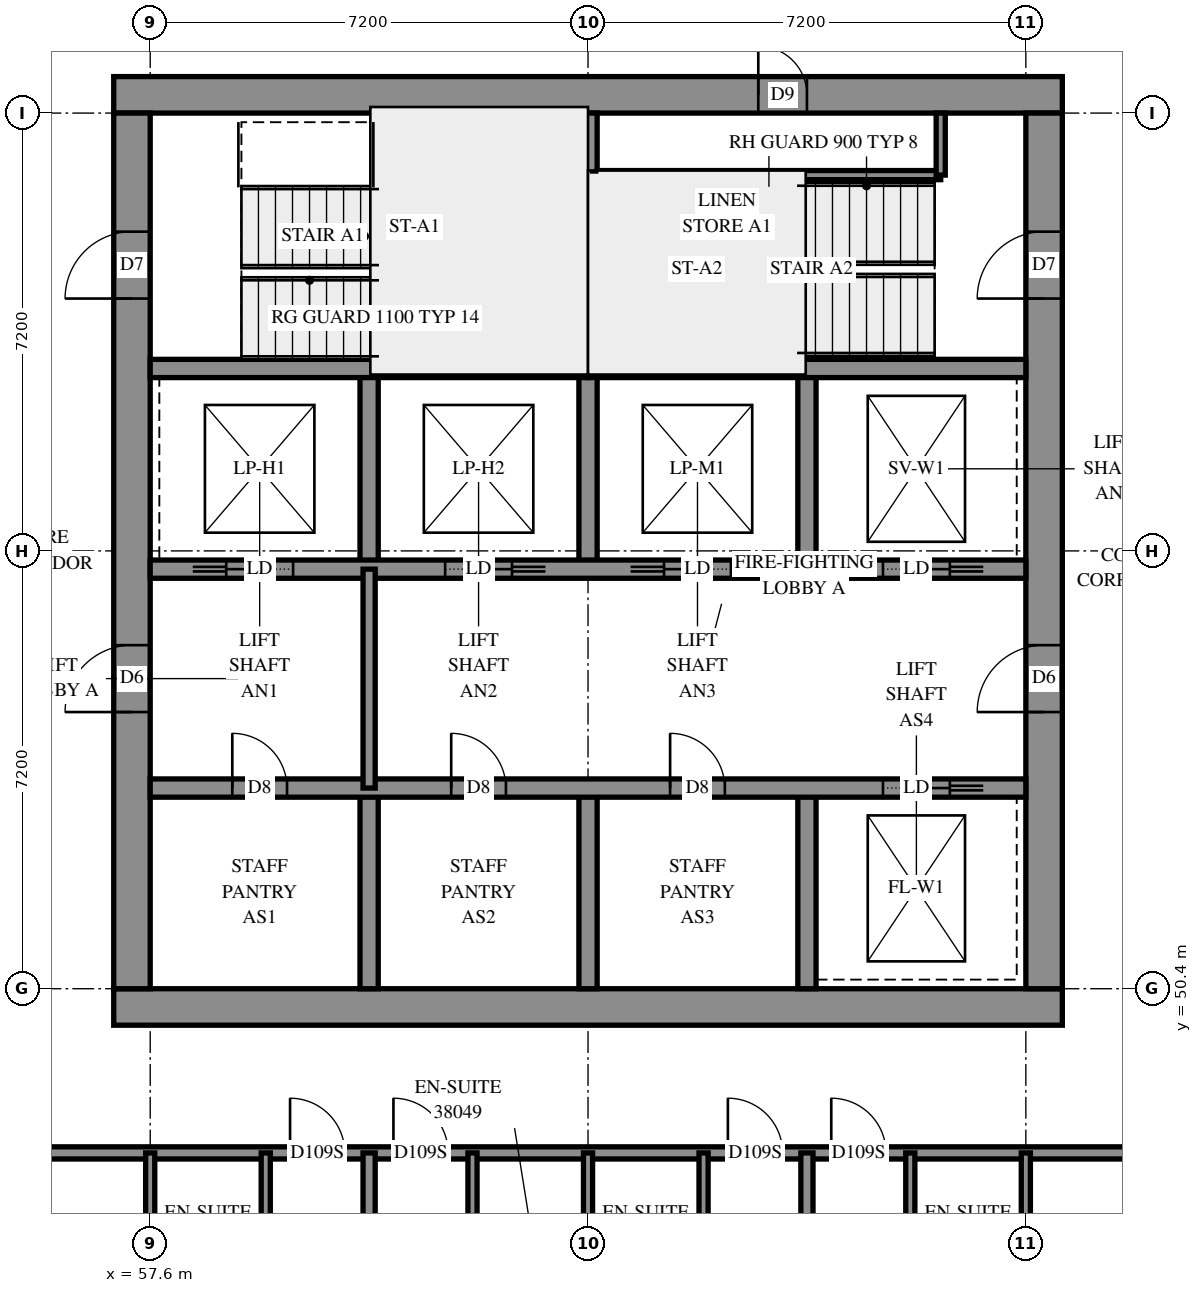
"""IFC4 building model, lengths in metres.
Left out: names, types, materials, properties, quantities, classifications, styles, units other than length and angle.
Written with IfcOpenShell. Run it as: python <this file> out.ifc"""

import sys

from ifc_helpers import new_model, si_unit, direction, frame, frame_2d, origin, place, context, subcontext, project, spatial, rectangle, extrude, element, fill, save


model = new_model("IFC4")
c1 = context("Model", 3, precision=1e-05, world=origin(), true_north=direction((0.0, 1.0)))
c2 = subcontext(c1, "Body", "Model", "MODEL_VIEW")
j1 = project(units=[si_unit("LENGTHUNIT", "METRE"), si_unit("PLANEANGLEUNIT", "RADIAN")], contexts=[c1])
p1 = place(None, origin())
s1 = spatial("IfcSite", under=j1, at=p1, CompositionType="ELEMENT")
p2 = place(p1, origin())
s2 = spatial("IfcBuilding", under=s1, at=p2, CompositionType="ELEMENT")
p3 = place(p2, frame((0.0, 0.0, 142.2)))
s3 = spatial("IfcBuildingStorey", under=s2, at=p3, CompositionType="ELEMENT", Elevation=142.2)
p4 = place(p3, frame((57.0, 50.1, -0.3), z_axis=(0.0, 0.0, 1.0), x_axis=(1.0, 0.0, 0.0)))
e1 = element("IfcWall", 1, at=p4, inside=s3, PredefinedType="SHEAR", context=c2, shape_type="SweptSolid", body=[
    extrude(rectangle(XDim=15.6, YDim=0.6, at=frame_2d((7.8, 0.0))), origin(), (0.0, 0.0, 1.0), 2.7),
])
p5 = place(p3, frame((57.0, 65.1, -0.3), z_axis=(0.0, 0.0, 1.0), x_axis=(1.0, 0.0, 0.0)))
e2 = element("IfcWall", 2, at=p5, inside=s3, PredefinedType="SHEAR", context=c2, shape_type="SweptSolid", body=[
    extrude(rectangle(XDim=15.6, YDim=0.6, at=frame_2d((7.8, 0.0))), origin(), (0.0, 0.0, 1.0), 2.7),
])
p6 = place(p5, frame((10.6, 0.0, 0.3)))
e3 = element("IfcOpeningElement", 3, at=p6, cuts=e2, PredefinedType="OPENING", context=c2, shape_type="SweptSolid", body=[
    extrude(rectangle(XDim=0.8, YDim=2.1, at=frame_2d((0.4, 1.05))), frame((0.0, 0.31, 0.0), z_axis=(0.0, -1.0, 0.0), x_axis=(1.0, 0.0, 0.0)), (0.0, 0.0, 1.0), 0.62),
])
p7 = place(p3, frame((57.3, 50.4, -0.3), z_axis=(0.0, 0.0, 1.0), x_axis=(0.0, 1.0, 0.0)))
e4 = element("IfcWall", 4, at=p7, inside=s3, PredefinedType="SHEAR", context=c2, shape_type="SweptSolid", body=[
    extrude(rectangle(XDim=14.4, YDim=0.6, at=frame_2d((7.2, 0.0))), origin(), (0.0, 0.0, 1.0), 2.7),
])
p8 = place(p7, frame((4.55, 0.0, 0.3)))
e5 = element("IfcOpeningElement", 5, at=p8, cuts=e4, PredefinedType="OPENING", context=c2, shape_type="SweptSolid", body=[
    extrude(rectangle(XDim=1.1, YDim=2.1, at=frame_2d((0.55, 1.05))), frame((0.0, 0.31, 0.0), z_axis=(0.0, -1.0, 0.0), x_axis=(1.0, 0.0, 0.0)), (0.0, 0.0, 1.0), 0.62),
])
p9 = place(p7, frame((11.35, 0.0, 0.3)))
e6 = element("IfcOpeningElement", 6, at=p9, cuts=e4, PredefinedType="OPENING", context=c2, shape_type="SweptSolid", body=[
    extrude(rectangle(XDim=1.1, YDim=2.1, at=frame_2d((0.55, 1.05))), frame((0.0, 0.31, 0.0), z_axis=(0.0, -1.0, 0.0), x_axis=(1.0, 0.0, 0.0)), (0.0, 0.0, 1.0), 0.62),
])
p10 = place(p3, frame((72.3, 50.4, -0.3), z_axis=(0.0, 0.0, 1.0), x_axis=(0.0, 1.0, 0.0)))
e7 = element("IfcWall", 7, at=p10, inside=s3, PredefinedType="SHEAR", context=c2, shape_type="SweptSolid", body=[
    extrude(rectangle(XDim=14.4, YDim=0.6, at=frame_2d((7.2, 0.0))), origin(), (0.0, 0.0, 1.0), 2.7),
])
p11 = place(p10, frame((4.55, 0.0, 0.3)))
e8 = element("IfcOpeningElement", 8, at=p11, cuts=e7, PredefinedType="OPENING", context=c2, shape_type="SweptSolid", body=[
    extrude(rectangle(XDim=1.1, YDim=2.1, at=frame_2d((0.55, 1.05))), frame((0.0, 0.31, 0.0), z_axis=(0.0, -1.0, 0.0), x_axis=(1.0, 0.0, 0.0)), (0.0, 0.0, 1.0), 0.62),
])
p12 = place(p10, frame((11.35, 0.0, 0.3)))
e9 = element("IfcOpeningElement", 9, at=p12, cuts=e7, PredefinedType="OPENING", context=c2, shape_type="SweptSolid", body=[
    extrude(rectangle(XDim=1.1, YDim=2.1, at=frame_2d((0.55, 1.05))), frame((0.0, 0.31, 0.0), z_axis=(0.0, -1.0, 0.0), x_axis=(1.0, 0.0, 0.0)), (0.0, 0.0, 1.0), 0.62),
])
for number, where, z_axis, x_axis in (
    (10, (61.2, 50.4, 0.0), (0.0, 0.0, 1.0), (0.0, 1.0, 0.0)),
    (11, (61.2, 57.3, 0.0), (0.0, 0.0, 1.0), (0.0, 1.0, 0.0)),
    (12, (64.8, 50.4, 0.0), (0.0, 0.0, 1.0), (0.0, 1.0, 0.0)),
    (13, (64.8, 57.3, 0.0), (0.0, 0.0, 1.0), (0.0, 1.0, 0.0)),
    (14, (68.4, 50.4, 0.0), (0.0, 0.0, 1.0), (0.0, 1.0, 0.0)),
    (15, (68.4, 57.3, 0.0), (0.0, 0.0, 1.0), (0.0, 1.0, 0.0)),
):
    element("IfcWall", number, at=place(p3, frame(where, z_axis=z_axis, x_axis=x_axis)), inside=s3, PredefinedType="SOLIDWALL", context=c2, shape_type="SweptSolid", body=[
        extrude(rectangle(XDim=3.3, YDim=0.3, at=frame_2d((1.65, 0.0))), origin(), (0.0, 0.0, 1.0), 3.1),
    ])
p13 = place(p3, frame((57.6, 53.7, 0.0), z_axis=(0.0, 0.0, 1.0), x_axis=(1.0, 0.0, 0.0)))
e16 = element("IfcWall", 16, at=p13, inside=s3, PredefinedType="SOLIDWALL", context=c2, shape_type="SweptSolid", body=[
    extrude(rectangle(XDim=14.4, YDim=0.3, at=frame_2d((7.2, 0.0))), origin(), (0.0, 0.0, 1.0), 3.1),
])
p14 = place(p13, frame((1.35, 0.0, 0.0)))
e17 = element("IfcOpeningElement", 17, at=p14, cuts=e16, PredefinedType="OPENING", context=c2, shape_type="SweptSolid", body=[
    extrude(rectangle(XDim=0.9, YDim=2.1, at=frame_2d((0.45, 1.05))), frame((0.0, 0.16, 0.0), z_axis=(0.0, -1.0, 0.0), x_axis=(1.0, 0.0, 0.0)), (0.0, 0.0, 1.0), 0.32),
])
p15 = place(p13, frame((4.95, 0.0, 0.0)))
e18 = element("IfcOpeningElement", 18, at=p15, cuts=e16, PredefinedType="OPENING", context=c2, shape_type="SweptSolid", body=[
    extrude(rectangle(XDim=0.9, YDim=2.1, at=frame_2d((0.45, 1.05))), frame((0.0, 0.16, 0.0), z_axis=(0.0, -1.0, 0.0), x_axis=(1.0, 0.0, 0.0)), (0.0, 0.0, 1.0), 0.32),
])
p16 = place(p13, frame((8.55, 0.0, 0.0)))
e19 = element("IfcOpeningElement", 19, at=p16, cuts=e16, PredefinedType="OPENING", context=c2, shape_type="SweptSolid", body=[
    extrude(rectangle(XDim=0.9, YDim=2.1, at=frame_2d((0.45, 1.05))), frame((0.0, 0.16, 0.0), z_axis=(0.0, -1.0, 0.0), x_axis=(1.0, 0.0, 0.0)), (0.0, 0.0, 1.0), 0.32),
])
p17 = place(p13, frame((12.05, 0.0, 0.0)))
e20 = element("IfcOpeningElement", 20, at=p17, cuts=e16, PredefinedType="OPENING", context=c2, shape_type="SweptSolid", body=[
    extrude(rectangle(XDim=1.1, YDim=2.1, at=frame_2d((0.55, 1.05))), frame((0.0, 0.16, 0.0), z_axis=(0.0, -1.0, 0.0), x_axis=(1.0, 0.0, 0.0)), (0.0, 0.0, 1.0), 0.32),
])
p18 = place(p3, frame((57.6, 57.3, 0.0), z_axis=(0.0, 0.0, 1.0), x_axis=(1.0, 0.0, 0.0)))
e21 = element("IfcWall", 21, at=p18, inside=s3, PredefinedType="SOLIDWALL", context=c2, shape_type="SweptSolid", body=[
    extrude(rectangle(XDim=14.4, YDim=0.3, at=frame_2d((7.2, 0.0))), origin(), (0.0, 0.0, 1.0), 3.1),
])
p19 = place(p18, frame((1.25, 0.0, 0.0)))
e22 = element("IfcOpeningElement", 22, at=p19, cuts=e21, PredefinedType="OPENING", context=c2, shape_type="SweptSolid", body=[
    extrude(rectangle(XDim=1.1, YDim=2.1, at=frame_2d((0.55, 1.05))), frame((0.0, 0.16, 0.0), z_axis=(0.0, -1.0, 0.0), x_axis=(1.0, 0.0, 0.0)), (0.0, 0.0, 1.0), 0.32),
])
p20 = place(p18, frame((4.85, 0.0, 0.0)))
e23 = element("IfcOpeningElement", 23, at=p20, cuts=e21, PredefinedType="OPENING", context=c2, shape_type="SweptSolid", body=[
    extrude(rectangle(XDim=1.1, YDim=2.1, at=frame_2d((0.55, 1.05))), frame((0.0, 0.16, 0.0), z_axis=(0.0, -1.0, 0.0), x_axis=(1.0, 0.0, 0.0)), (0.0, 0.0, 1.0), 0.32),
])
p21 = place(p18, frame((8.45, 0.0, 0.0)))
e24 = element("IfcOpeningElement", 24, at=p21, cuts=e21, PredefinedType="OPENING", context=c2, shape_type="SweptSolid", body=[
    extrude(rectangle(XDim=1.1, YDim=2.1, at=frame_2d((0.55, 1.05))), frame((0.0, 0.16, 0.0), z_axis=(0.0, -1.0, 0.0), x_axis=(1.0, 0.0, 0.0)), (0.0, 0.0, 1.0), 0.32),
])
p22 = place(p18, frame((12.05, 0.0, 0.0)))
e25 = element("IfcOpeningElement", 25, at=p22, cuts=e21, PredefinedType="OPENING", context=c2, shape_type="SweptSolid", body=[
    extrude(rectangle(XDim=1.1, YDim=2.1, at=frame_2d((0.55, 1.05))), frame((0.0, 0.16, 0.0), z_axis=(0.0, -1.0, 0.0), x_axis=(1.0, 0.0, 0.0)), (0.0, 0.0, 1.0), 0.32),
])
for number, where, z_axis, x_axis in (
    (26, (57.6, 60.6, 0.0), (0.0, 0.0, 1.0), (1.0, 0.0, 0.0)),
    (27, (64.8, 60.6, 0.0), (0.0, 0.0, 1.0), (1.0, 0.0, 0.0)),
):
    element("IfcWall", number, at=place(p3, frame(where, z_axis=z_axis, x_axis=x_axis)), inside=s3, PredefinedType="SOLIDWALL", context=c2, shape_type="SweptSolid", body=[
        extrude(rectangle(XDim=7.2, YDim=0.3, at=frame_2d((3.6, 0.0))), origin(), (0.0, 0.0, 1.0), 3.1),
    ])
p23 = place(p3, frame((64.8, 60.6, 0.0), z_axis=(0.0, 0.0, 1.0), x_axis=(0.0, 1.0, 0.0)))
e28 = element("IfcWall", 28, at=p23, inside=s3, PredefinedType="SOLIDWALL", context=c2, shape_type="SweptSolid", body=[
    extrude(rectangle(XDim=4.2, YDim=0.3, at=frame_2d((2.1, 0.0))), origin(), (0.0, 0.0, 1.0), 3.1),
])
p24 = place(p3, frame((64.95, 63.78, 0.0), z_axis=(0.0, 0.0, 1.0), x_axis=(1.0, 0.0, 0.0)))
e29 = element("IfcWall", 29, at=p24, inside=s3, PredefinedType="PARTITIONING", context=c2, shape_type="SweptSolid", body=[
    extrude(rectangle(XDim=5.65, YDim=0.15, at=frame_2d((2.825, 0.0))), origin(), (0.0, 0.0, 1.0), 3.1),
])
p25 = place(p3, frame((70.6, 63.78, 0.0), z_axis=(0.0, 0.0, 1.0), x_axis=(0.0, 1.0, 0.0)))
e30 = element("IfcWall", 30, at=p25, inside=s3, PredefinedType="PARTITIONING", context=c2, shape_type="SweptSolid", body=[
    extrude(rectangle(XDim=1.02, YDim=0.15, at=frame_2d((0.51, 0.0))), origin(), (0.0, 0.0, 1.0), 3.1),
])
p26 = place(p3, frame((61.2, 53.7, 0.0), z_axis=(0.0, 0.0, 1.0), x_axis=(0.0, 1.0, 0.0)))
e31 = element("IfcWall", 31, at=p26, inside=s3, PredefinedType="PARTITIONING", context=c2, shape_type="SweptSolid", body=[
    extrude(rectangle(XDim=3.6, YDim=0.2, at=frame_2d((1.8, 0.0))), origin(), (0.0, 0.0, 1.0), 3.1),
])
p27 = place(p3, frame((54.9, 47.7, 0.0), z_axis=(0.0, 0.0, 1.0), x_axis=(1.0, 0.0, 0.0)))
e32 = element("IfcWall", 32, at=p27, inside=s3, PredefinedType="PARTITIONING", context=c2, shape_type="SweptSolid", body=[
    extrude(rectangle(XDim=19.326, YDim=0.2, at=frame_2d((9.663, 0.0))), origin(), (0.0, 0.0, 1.0), 3.1),
])
p28 = place(p27, frame((5.0, 0.0, 0.0)))
e33 = element("IfcOpeningElement", 33, at=p28, cuts=e32, PredefinedType="OPENING", context=c2, shape_type="SweptSolid", body=[
    extrude(rectangle(XDim=0.9, YDim=2.1, at=frame_2d((0.45, 1.05))), frame((0.0, 0.11, 0.0), z_axis=(0.0, -1.0, 0.0), x_axis=(1.0, 0.0, 0.0)), (0.0, 0.0, 1.0), 0.22),
])
p29 = place(p27, frame((12.2, 0.0, 0.0)))
e34 = element("IfcOpeningElement", 34, at=p29, cuts=e32, PredefinedType="OPENING", context=c2, shape_type="SweptSolid", body=[
    extrude(rectangle(XDim=0.9, YDim=2.1, at=frame_2d((0.45, 1.05))), frame((0.0, 0.11, 0.0), z_axis=(0.0, -1.0, 0.0), x_axis=(1.0, 0.0, 0.0)), (0.0, 0.0, 1.0), 0.22),
])
p30 = place(p27, frame((6.7, 0.0, 0.0)))
e35 = element("IfcOpeningElement", 35, at=p30, cuts=e32, PredefinedType="OPENING", context=c2, shape_type="SweptSolid", body=[
    extrude(rectangle(XDim=0.9, YDim=2.1, at=frame_2d((0.45, 1.05))), frame((0.0, 0.11, 0.0), z_axis=(0.0, -1.0, 0.0), x_axis=(1.0, 0.0, 0.0)), (0.0, 0.0, 1.0), 0.22),
])
p31 = place(p27, frame((13.9, 0.0, 0.0)))
e36 = element("IfcOpeningElement", 36, at=p31, cuts=e32, PredefinedType="OPENING", context=c2, shape_type="SweptSolid", body=[
    extrude(rectangle(XDim=0.9, YDim=2.1, at=frame_2d((0.45, 1.05))), frame((0.0, 0.11, 0.0), z_axis=(0.0, -1.0, 0.0), x_axis=(1.0, 0.0, 0.0)), (0.0, 0.0, 1.0), 0.22),
])
p32 = place(p3, frame((68.4, 42.281, 0.0), z_axis=(0.0, 0.0, 1.0), x_axis=(0.0, 1.0, 0.0)))
e37 = element("IfcWall", 37, at=p32, inside=s3, PredefinedType="PARTITIONING", context=c2, shape_type="SweptSolid", body=[
    extrude(rectangle(XDim=5.419, YDim=0.2, at=frame_2d((2.709, 0.0))), origin(), (0.0, 0.0, 1.0), 3.1),
])
p33 = place(p3, frame((61.2, 42.319, 0.0), z_axis=(0.0, 0.0, 1.0), x_axis=(0.0, 1.0, 0.0)))
e38 = element("IfcWall", 38, at=p33, inside=s3, PredefinedType="PARTITIONING", context=c2, shape_type="SweptSolid", body=[
    extrude(rectangle(XDim=5.381, YDim=0.2, at=frame_2d((2.691, 0.0))), origin(), (0.0, 0.0, 1.0), 3.1),
])
for number, where, z_axis, x_axis in (
    (39, (59.5, 45.3, 0.0), (0.0, 0.0, 1.0), (0.0, 1.0, 0.0)),
    (40, (57.6, 45.3, 0.0), (0.0, 0.0, 1.0), (0.0, 1.0, 0.0)),
    (41, (62.9, 45.3, 0.0), (0.0, 0.0, 1.0), (0.0, 1.0, 0.0)),
    (42, (66.7, 45.3, 0.0), (0.0, 0.0, 1.0), (0.0, 1.0, 0.0)),
    (43, (64.8, 45.3, 0.0), (0.0, 0.0, 1.0), (0.0, 1.0, 0.0)),
    (44, (70.1, 45.3, 0.0), (0.0, 0.0, 1.0), (0.0, 1.0, 0.0)),
    (45, (72.0, 45.3, 0.0), (0.0, 0.0, 1.0), (0.0, 1.0, 0.0)),
):
    element("IfcWall", number, at=place(p3, frame(where, z_axis=z_axis, x_axis=x_axis)), inside=s3, PredefinedType="PARTITIONING", context=c2, shape_type="SweptSolid", body=[
        extrude(rectangle(XDim=2.4, YDim=0.15, at=frame_2d((1.2, 0.0))), origin(), (0.0, 0.0, 1.0), 3.1),
    ])
p34 = place(p6, origin())
e46 = element("IfcDoor", 46, at=p34, inside=s3, OperationType="SINGLE_SWING_RIGHT", PredefinedType="DOOR", context=c2, shape_type="SweptSolid", body=[
    extrude(rectangle(XDim=0.8, YDim=2.1, at=frame_2d((0.4, 1.05))), frame((0.0, 0.025, 0.0), z_axis=(0.0, -1.0, 0.0), x_axis=(1.0, 0.0, 0.0)), (0.0, 0.0, 1.0), 0.05),
])
fill(e3, e46)
p35 = place(p8, origin())
e47 = element("IfcDoor", 47, at=p35, inside=s3, OperationType="DOUBLE_DOOR_SINGLE_SWING", PredefinedType="DOOR", context=c2, shape_type="SweptSolid", body=[
    extrude(rectangle(XDim=1.1, YDim=2.1, at=frame_2d((0.55, 1.05))), frame((0.0, 0.025, 0.0), z_axis=(0.0, -1.0, 0.0), x_axis=(1.0, 0.0, 0.0)), (0.0, 0.0, 1.0), 0.05),
])
fill(e5, e47)
p36 = place(p11, origin())
e48 = element("IfcDoor", 48, at=p36, inside=s3, OperationType="DOUBLE_DOOR_SINGLE_SWING", PredefinedType="DOOR", context=c2, shape_type="SweptSolid", body=[
    extrude(rectangle(XDim=1.1, YDim=2.1, at=frame_2d((0.55, 1.05))), frame((0.0, 0.025, 0.0), z_axis=(0.0, -1.0, 0.0), x_axis=(1.0, 0.0, 0.0)), (0.0, 0.0, 1.0), 0.05),
])
fill(e8, e48)
p37 = place(p9, origin())
e49 = element("IfcDoor", 49, at=p37, inside=s3, OperationType="SINGLE_SWING_LEFT", PredefinedType="DOOR", context=c2, shape_type="SweptSolid", body=[
    extrude(rectangle(XDim=1.1, YDim=2.1, at=frame_2d((0.55, 1.05))), frame((0.0, 0.025, 0.0), z_axis=(0.0, -1.0, 0.0), x_axis=(1.0, 0.0, 0.0)), (0.0, 0.0, 1.0), 0.05),
])
fill(e6, e49)
p38 = place(p12, origin())
e50 = element("IfcDoor", 50, at=p38, inside=s3, OperationType="SINGLE_SWING_RIGHT", PredefinedType="DOOR", context=c2, shape_type="SweptSolid", body=[
    extrude(rectangle(XDim=1.1, YDim=2.1, at=frame_2d((0.55, 1.05))), frame((0.0, 0.025, 0.0), z_axis=(0.0, -1.0, 0.0), x_axis=(1.0, 0.0, 0.0)), (0.0, 0.0, 1.0), 0.05),
])
fill(e9, e50)
p39 = place(p14, origin())
e51 = element("IfcDoor", 51, at=p39, inside=s3, OperationType="SINGLE_SWING_LEFT", PredefinedType="DOOR", context=c2, shape_type="SweptSolid", body=[
    extrude(rectangle(XDim=0.9, YDim=2.1, at=frame_2d((0.45, 1.05))), frame((0.0, 0.025, 0.0), z_axis=(0.0, -1.0, 0.0), x_axis=(1.0, 0.0, 0.0)), (0.0, 0.0, 1.0), 0.05),
])
fill(e17, e51)
p40 = place(p15, origin())
e52 = element("IfcDoor", 52, at=p40, inside=s3, OperationType="SINGLE_SWING_LEFT", PredefinedType="DOOR", context=c2, shape_type="SweptSolid", body=[
    extrude(rectangle(XDim=0.9, YDim=2.1, at=frame_2d((0.45, 1.05))), frame((0.0, 0.025, 0.0), z_axis=(0.0, -1.0, 0.0), x_axis=(1.0, 0.0, 0.0)), (0.0, 0.0, 1.0), 0.05),
])
fill(e18, e52)
p41 = place(p16, origin())
e53 = element("IfcDoor", 53, at=p41, inside=s3, OperationType="SINGLE_SWING_LEFT", PredefinedType="DOOR", context=c2, shape_type="SweptSolid", body=[
    extrude(rectangle(XDim=0.9, YDim=2.1, at=frame_2d((0.45, 1.05))), frame((0.0, 0.025, 0.0), z_axis=(0.0, -1.0, 0.0), x_axis=(1.0, 0.0, 0.0)), (0.0, 0.0, 1.0), 0.05),
])
fill(e19, e53)
p42 = place(p17, origin())
e54 = element("IfcDoor", 54, at=p42, inside=s3, OperationType="SLIDING_TO_RIGHT", PredefinedType="DOOR", context=c2, shape_type="SweptSolid", body=[
    extrude(rectangle(XDim=1.1, YDim=2.1, at=frame_2d((0.55, 1.05))), frame((0.0, 0.025, 0.0), z_axis=(0.0, -1.0, 0.0), x_axis=(1.0, 0.0, 0.0)), (0.0, 0.0, 1.0), 0.05),
])
fill(e20, e54)
p43 = place(p19, origin())
e55 = element("IfcDoor", 55, at=p43, inside=s3, OperationType="SLIDING_TO_LEFT", PredefinedType="DOOR", context=c2, shape_type="SweptSolid", body=[
    extrude(rectangle(XDim=1.1, YDim=2.1, at=frame_2d((0.55, 1.05))), frame((0.0, 0.025, 0.0), z_axis=(0.0, -1.0, 0.0), x_axis=(1.0, 0.0, 0.0)), (0.0, 0.0, 1.0), 0.05),
])
fill(e22, e55)
p44 = place(p20, origin())
e56 = element("IfcDoor", 56, at=p44, inside=s3, OperationType="SLIDING_TO_RIGHT", PredefinedType="DOOR", context=c2, shape_type="SweptSolid", body=[
    extrude(rectangle(XDim=1.1, YDim=2.1, at=frame_2d((0.55, 1.05))), frame((0.0, 0.025, 0.0), z_axis=(0.0, -1.0, 0.0), x_axis=(1.0, 0.0, 0.0)), (0.0, 0.0, 1.0), 0.05),
])
fill(e23, e56)
p45 = place(p21, origin())
e57 = element("IfcDoor", 57, at=p45, inside=s3, OperationType="SLIDING_TO_LEFT", PredefinedType="DOOR", context=c2, shape_type="SweptSolid", body=[
    extrude(rectangle(XDim=1.1, YDim=2.1, at=frame_2d((0.55, 1.05))), frame((0.0, 0.025, 0.0), z_axis=(0.0, -1.0, 0.0), x_axis=(1.0, 0.0, 0.0)), (0.0, 0.0, 1.0), 0.05),
])
fill(e24, e57)
p46 = place(p22, origin())
e58 = element("IfcDoor", 58, at=p46, inside=s3, OperationType="SLIDING_TO_RIGHT", PredefinedType="DOOR", context=c2, shape_type="SweptSolid", body=[
    extrude(rectangle(XDim=1.1, YDim=2.1, at=frame_2d((0.55, 1.05))), frame((0.0, 0.025, 0.0), z_axis=(0.0, -1.0, 0.0), x_axis=(1.0, 0.0, 0.0)), (0.0, 0.0, 1.0), 0.05),
])
fill(e25, e58)
p47 = place(p28, origin())
e59 = element("IfcDoor", 59, at=p47, inside=s3, OperationType="SINGLE_SWING_LEFT", PredefinedType="DOOR", context=c2, shape_type="SweptSolid", body=[
    extrude(rectangle(XDim=0.9, YDim=2.1, at=frame_2d((0.45, 1.05))), frame((0.0, 0.025, 0.0), z_axis=(0.0, -1.0, 0.0), x_axis=(1.0, 0.0, 0.0)), (0.0, 0.0, 1.0), 0.05),
])
fill(e33, e59)
p48 = place(p29, origin())
e60 = element("IfcDoor", 60, at=p48, inside=s3, OperationType="SINGLE_SWING_LEFT", PredefinedType="DOOR", context=c2, shape_type="SweptSolid", body=[
    extrude(rectangle(XDim=0.9, YDim=2.1, at=frame_2d((0.45, 1.05))), frame((0.0, 0.025, 0.0), z_axis=(0.0, -1.0, 0.0), x_axis=(1.0, 0.0, 0.0)), (0.0, 0.0, 1.0), 0.05),
])
fill(e34, e60)
p49 = place(p30, origin())
e61 = element("IfcDoor", 61, at=p49, inside=s3, OperationType="SINGLE_SWING_RIGHT", PredefinedType="DOOR", context=c2, shape_type="SweptSolid", body=[
    extrude(rectangle(XDim=0.9, YDim=2.1, at=frame_2d((0.45, 1.05))), frame((0.0, 0.025, 0.0), z_axis=(0.0, -1.0, 0.0), x_axis=(1.0, 0.0, 0.0)), (0.0, 0.0, 1.0), 0.05),
])
fill(e35, e61)
p50 = place(p31, origin())
e62 = element("IfcDoor", 62, at=p50, inside=s3, OperationType="SINGLE_SWING_RIGHT", PredefinedType="DOOR", context=c2, shape_type="SweptSolid", body=[
    extrude(rectangle(XDim=0.9, YDim=2.1, at=frame_2d((0.45, 1.05))), frame((0.0, 0.025, 0.0), z_axis=(0.0, -1.0, 0.0), x_axis=(1.0, 0.0, 0.0)), (0.0, 0.0, 1.0), 0.05),
])
fill(e36, e62)
save(model, sys.argv[1])
